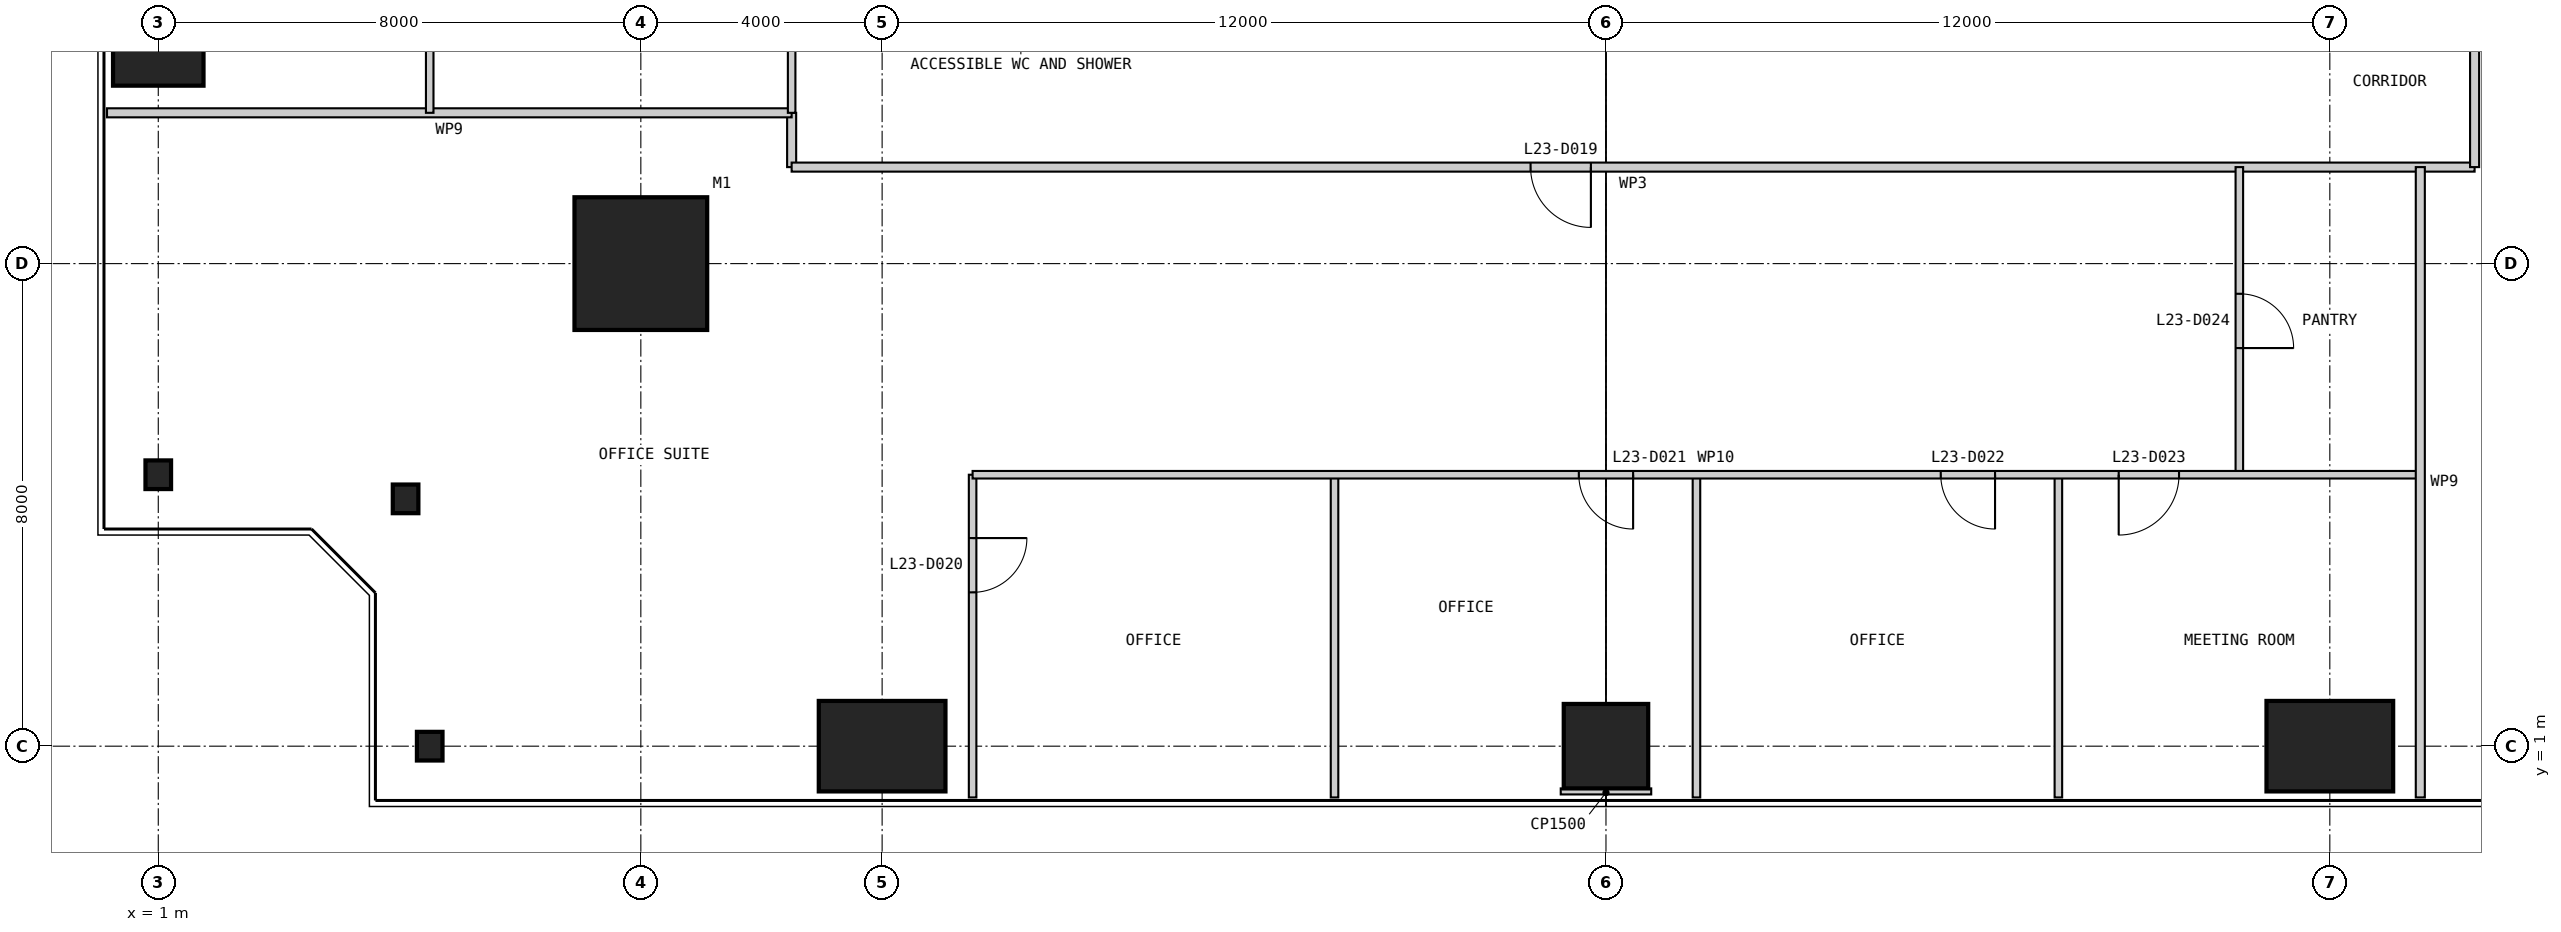
"""IFC4 building model, lengths in metres.
Left out: names, types, materials, properties, quantities, classifications, styles, units other than length and angle.
Written with IfcOpenShell. Run it as: python <this file> out.ifc"""

import sys

from ifc_helpers import new_model, si_unit, direction, frame, frame_2d, origin, origin_2d, place, context, subcontext, project, spatial, rectangle, i_section, extrude, element, fill, save


model = new_model("IFC4")
c1 = context("Model", 3, precision=1e-05, world=origin(), true_north=direction((0.0, 1.0)))
c2 = subcontext(c1, "Body", "Model", "MODEL_VIEW")
j1 = project(units=[si_unit("LENGTHUNIT", "METRE"), si_unit("PLANEANGLEUNIT", "RADIAN")], contexts=[c1])
p1 = place(None, origin())
s1 = spatial("IfcSite", under=j1, at=p1, CompositionType="ELEMENT")
p2 = place(p1, origin())
s2 = spatial("IfcBuilding", under=s1, at=p2, CompositionType="ELEMENT")
p3 = place(p2, frame((0.0, 0.0, 102.4)))
s3 = spatial("IfcBuildingStorey", under=s2, at=p3, CompositionType="ELEMENT", Elevation=102.4)
p4 = place(p3, frame((9.0, 9.0, 0.0), z_axis=(0.0, 0.0, 1.0), x_axis=(1.0, 0.0, 0.0)))
e1 = element("IfcColumn", 1, at=p4, inside=s3, PredefinedType="COLUMN", context=c2, shape_type="SweptSolid", body=[
    extrude(rectangle(XDim=2.2, YDim=2.2, at=origin_2d()), origin(), (0.0, 0.0, 1.0), 4.0),
])
p5 = place(p3, frame((5.5, 1.0, 0.0), z_axis=(0.0, 0.0, 1.0), x_axis=(1.0, 0.0, 0.0)))
e2 = element("IfcColumn", 2, at=p5, inside=s3, PredefinedType="COLUMN", context=c2, shape_type="SweptSolid", body=[
    extrude(i_section(OverallWidth=0.424, OverallDepth=0.475, WebThickness=0.048, FlangeThickness=0.077, at=origin_2d()), origin(), (0.0, 0.0, 1.0), 4.0),
])
p6 = place(p3, frame((13.0, 1.0, 0.0), z_axis=(0.0, 0.0, 1.0), x_axis=(1.0, 0.0, 0.0)))
e3 = element("IfcColumn", 3, at=p6, inside=s3, PredefinedType="COLUMN", context=c2, shape_type="SweptSolid", body=[
    extrude(rectangle(XDim=2.1, YDim=1.5, at=origin_2d()), origin(), (0.0, 0.0, 1.0), 4.0),
])
p7 = place(p3, frame((25.0, 1.0, 0.0), z_axis=(0.0, 0.0, 1.0), x_axis=(1.0, 0.0, 0.0)))
e4 = element("IfcColumn", 4, at=p7, inside=s3, PredefinedType="COLUMN", context=c2, shape_type="SweptSolid", body=[
    extrude(rectangle(XDim=1.4, YDim=1.4, at=origin_2d()), origin(), (0.0, 0.0, 1.0), 4.0),
])
p8 = place(p3, frame((37.0, 1.0, 0.0), z_axis=(0.0, 0.0, 1.0), x_axis=(1.0, 0.0, 0.0)))
e5 = element("IfcColumn", 5, at=p8, inside=s3, PredefinedType="COLUMN", context=c2, shape_type="SweptSolid", body=[
    extrude(rectangle(XDim=2.1, YDim=1.5, at=origin_2d()), origin(), (0.0, 0.0, 1.0), 4.0),
])
p9 = place(p3, frame((1.0, 13.0, 0.0), z_axis=(0.0, 0.0, 1.0), x_axis=(1.0, 0.0, 0.0)))
e6 = element("IfcColumn", 6, at=p9, inside=s3, PredefinedType="COLUMN", context=c2, shape_type="SweptSolid", body=[
    extrude(rectangle(XDim=1.5, YDim=2.1, at=origin_2d()), origin(), (0.0, 0.0, 1.0), 4.0),
])
for number, where, z_axis, x_axis in (
    (7, (1.0, 5.5, 0.0), (0.0, 0.0, 1.0), (1.0, 0.0, 0.0)),
    (8, (5.1, 5.1, 0.0), (0.0, 0.0, 1.0), (1.0, 0.0, 0.0)),
):
    element("IfcColumn", number, at=place(p3, frame(where, z_axis=z_axis, x_axis=x_axis)), inside=s3, PredefinedType="COLUMN", context=c2, shape_type="SweptSolid", body=[
        extrude(i_section(OverallWidth=0.424, OverallDepth=0.475, WebThickness=0.048, FlangeThickness=0.077, at=origin_2d()), origin(), (0.0, 0.0, 1.0), 4.0),
    ])
p10 = place(p3, frame((11.5, 11.5, 0.0), z_axis=(0.0, 0.0, 1.0), x_axis=(0.0, -1.0, 0.0)))
e9 = element("IfcWall", 9, at=p10, inside=s3, PredefinedType="PARTITIONING", context=c2, shape_type="SweptSolid", body=[
    extrude(rectangle(XDim=0.9, YDim=0.15, at=frame_2d((0.45, 0.0))), origin(), (0.0, 0.0, 1.0), 3.85),
])
p11 = place(p3, frame((11.5, 10.6, 0.0), z_axis=(0.0, 0.0, 1.0), x_axis=(1.0, 0.0, 0.0)))
e10 = element("IfcWall", 10, at=p11, inside=s3, PredefinedType="PARTITIONING", context=c2, shape_type="SweptSolid", body=[
    extrude(rectangle(XDim=27.9, YDim=0.15, at=frame_2d((13.95, 0.0))), origin(), (0.0, 0.0, 1.0), 3.85),
])
p12 = place(p11, frame((12.25, 0.0, 0.0)))
e11 = element("IfcOpeningElement", 11, at=p12, cuts=e10, PredefinedType="OPENING", context=c2, shape_type="SweptSolid", body=[
    extrude(rectangle(XDim=1.0, YDim=2.2, at=frame_2d((0.5, 1.1))), frame((0.0, 0.085, 0.0), z_axis=(0.0, -1.0, 0.0), x_axis=(1.0, 0.0, 0.0)), (0.0, 0.0, 1.0), 0.17),
])
p13 = place(p3, frame((0.15, 11.5, 0.0), z_axis=(0.0, 0.0, 1.0), x_axis=(1.0, 0.0, 0.0)))
e12 = element("IfcWall", 12, at=p13, inside=s3, PredefinedType="PARTITIONING", context=c2, shape_type="SweptSolid", body=[
    extrude(rectangle(XDim=11.35, YDim=0.15, at=frame_2d((5.675, 0.0))), origin(), (0.0, 0.0, 1.0), 3.85),
])
p14 = place(p3, frame((14.5, 0.15, 0.0), z_axis=(0.0, 0.0, 1.0), x_axis=(0.0, 1.0, 0.0)))
e13 = element("IfcWall", 13, at=p14, inside=s3, PredefinedType="PARTITIONING", context=c2, shape_type="SweptSolid", body=[
    extrude(rectangle(XDim=5.35, YDim=0.125, at=frame_2d((2.675, 0.0))), origin(), (0.0, 0.0, 1.0), 3.85),
])
p15 = place(p14, frame((3.4, 0.0, 0.0)))
e14 = element("IfcOpeningElement", 14, at=p15, cuts=e13, PredefinedType="OPENING", context=c2, shape_type="SweptSolid", body=[
    extrude(rectangle(XDim=0.9, YDim=2.2, at=frame_2d((0.45, 1.1))), frame((0.0, 0.073, 0.0), z_axis=(0.0, -1.0, 0.0), x_axis=(1.0, 0.0, 0.0)), (0.0, 0.0, 1.0), 0.145),
])
for number, where, z_axis, x_axis in (
    (15, (20.5, 0.15, 0.0), (0.0, 0.0, 1.0), (0.0, 1.0, 0.0)),
    (16, (26.5, 0.15, 0.0), (0.0, 0.0, 1.0), (0.0, 1.0, 0.0)),
    (17, (32.5, 0.15, 0.0), (0.0, 0.0, 1.0), (0.0, 1.0, 0.0)),
):
    element("IfcWall", number, at=place(p3, frame(where, z_axis=z_axis, x_axis=x_axis)), inside=s3, PredefinedType="PARTITIONING", context=c2, shape_type="SweptSolid", body=[
        extrude(rectangle(XDim=5.35, YDim=0.125, at=frame_2d((2.675, 0.0))), origin(), (0.0, 0.0, 1.0), 3.85),
    ])
p16 = place(p3, frame((35.5, 5.5, 0.0), z_axis=(0.0, 0.0, 1.0), x_axis=(0.0, 1.0, 0.0)))
e18 = element("IfcWall", 18, at=p16, inside=s3, PredefinedType="PARTITIONING", context=c2, shape_type="SweptSolid", body=[
    extrude(rectangle(XDim=5.1, YDim=0.125, at=frame_2d((2.55, 0.0))), origin(), (0.0, 0.0, 1.0), 3.85),
])
p17 = place(p16, frame((2.1, 0.0, 0.0)))
e19 = element("IfcOpeningElement", 19, at=p17, cuts=e18, PredefinedType="OPENING", context=c2, shape_type="SweptSolid", body=[
    extrude(rectangle(XDim=0.9, YDim=2.2, at=frame_2d((0.45, 1.1))), frame((0.0, 0.073, 0.0), z_axis=(0.0, -1.0, 0.0), x_axis=(1.0, 0.0, 0.0)), (0.0, 0.0, 1.0), 0.145),
])
p18 = place(p3, frame((14.5, 5.5, 0.0), z_axis=(0.0, 0.0, 1.0), x_axis=(1.0, 0.0, 0.0)))
e20 = element("IfcWall", 20, at=p18, inside=s3, PredefinedType="PARTITIONING", context=c2, shape_type="SweptSolid", body=[
    extrude(rectangle(XDim=24.0, YDim=0.125, at=frame_2d((12.0, 0.0))), origin(), (0.0, 0.0, 1.0), 3.85),
])
p19 = place(p18, frame((10.05, 0.0, 0.0)))
e21 = element("IfcOpeningElement", 21, at=p19, cuts=e20, PredefinedType="OPENING", context=c2, shape_type="SweptSolid", body=[
    extrude(rectangle(XDim=0.9, YDim=2.2, at=frame_2d((0.45, 1.1))), frame((0.0, 0.073, 0.0), z_axis=(0.0, -1.0, 0.0), x_axis=(1.0, 0.0, 0.0)), (0.0, 0.0, 1.0), 0.145),
])
p20 = place(p18, frame((16.05, 0.0, 0.0)))
e22 = element("IfcOpeningElement", 22, at=p20, cuts=e20, PredefinedType="OPENING", context=c2, shape_type="SweptSolid", body=[
    extrude(rectangle(XDim=0.9, YDim=2.2, at=frame_2d((0.45, 1.1))), frame((0.0, 0.073, 0.0), z_axis=(0.0, -1.0, 0.0), x_axis=(1.0, 0.0, 0.0)), (0.0, 0.0, 1.0), 0.145),
])
p21 = place(p18, frame((19.0, 0.0, 0.0)))
e23 = element("IfcOpeningElement", 23, at=p21, cuts=e20, PredefinedType="OPENING", context=c2, shape_type="SweptSolid", body=[
    extrude(rectangle(XDim=1.0, YDim=2.2, at=frame_2d((0.5, 1.1))), frame((0.0, 0.073, 0.0), z_axis=(0.0, -1.0, 0.0), x_axis=(1.0, 0.0, 0.0)), (0.0, 0.0, 1.0), 0.145),
])
p22 = place(p3, frame((39.4, 10.6, 0.0), z_axis=(0.0, 0.0, 1.0), x_axis=(0.0, 1.0, 0.0)))
e24 = element("IfcWall", 24, at=p22, inside=s3, PredefinedType="PARTITIONING", context=c2, shape_type="SweptSolid", body=[
    extrude(rectangle(XDim=28.8, YDim=0.15, at=frame_2d((14.4, 0.0))), origin(), (0.0, 0.0, 1.0), 3.85),
])
p23 = place(p22, frame((12.4, 0.0, 0.0)))
e25 = element("IfcOpeningElement", 25, at=p23, cuts=e24, PredefinedType="OPENING", context=c2, shape_type="SweptSolid", body=[
    extrude(rectangle(XDim=1.0, YDim=2.2, at=frame_2d((0.5, 1.1))), frame((0.0, 0.085, 0.0), z_axis=(0.0, -1.0, 0.0), x_axis=(1.0, 0.0, 0.0)), (0.0, 0.0, 1.0), 0.17),
])
p24 = place(p3, frame((38.5, 0.15, 0.0), z_axis=(0.0, 0.0, 1.0), x_axis=(0.0, 1.0, 0.0)))
e26 = element("IfcWall", 26, at=p24, inside=s3, PredefinedType="PARTITIONING", context=c2, shape_type="SweptSolid", body=[
    extrude(rectangle(XDim=10.45, YDim=0.15, at=frame_2d((5.225, 0.0))), origin(), (0.0, 0.0, 1.0), 3.85),
])
p25 = place(p3, frame((5.5, 17.5, 0.0), z_axis=(0.0, 0.0, 1.0), x_axis=(0.0, -1.0, 0.0)))
e27 = element("IfcWall", 27, at=p25, inside=s3, PredefinedType="PARTITIONING", context=c2, shape_type="SweptSolid", body=[
    extrude(rectangle(XDim=6.0, YDim=0.125, at=frame_2d((3.0, 0.0))), origin(), (0.0, 0.0, 1.0), 3.85),
])
p26 = place(p3, frame((11.5, 14.5, 0.0), z_axis=(0.0, 0.0, 1.0), x_axis=(0.0, -1.0, 0.0)))
e28 = element("IfcWall", 28, at=p26, inside=s3, PredefinedType="PARTITIONING", context=c2, shape_type="SweptSolid", body=[
    extrude(rectangle(XDim=3.0, YDim=0.125, at=frame_2d((1.5, 0.0))), origin(), (0.0, 0.0, 1.0), 3.85),
])
p27 = place(p3, frame((25.0, 0.2, 0.0), z_axis=(0.0, 0.0, 1.0), x_axis=(0.0, 1.0, 0.0)))
e29 = element("IfcWall", 29, at=p27, inside=s3, PredefinedType="PARTITIONING", context=c2, shape_type="SweptSolid", body=[
    extrude(rectangle(XDim=0.1, YDim=1.5, at=frame_2d((0.05, 0.0))), origin(), (0.0, 0.0, 1.0), 3.85),
])
p28 = place(p12, frame((1.0, 0.0, 0.0), z_axis=(0.0, 0.0, 1.0), x_axis=(-1.0, 0.0, 0.0)))
e30 = element("IfcDoor", 30, at=p28, inside=s3, OperationType="SINGLE_SWING_LEFT", PredefinedType="DOOR", context=c2, shape_type="SweptSolid", body=[
    extrude(rectangle(XDim=1.0, YDim=2.2, at=frame_2d((0.5, 1.1))), frame((0.0, 0.025, 0.0), z_axis=(0.0, -1.0, 0.0), x_axis=(1.0, 0.0, 0.0)), (0.0, 0.0, 1.0), 0.05),
])
fill(e11, e30)
p29 = place(p15, frame((0.9, 0.0, 0.0), z_axis=(0.0, 0.0, 1.0), x_axis=(-1.0, 0.0, 0.0)))
e31 = element("IfcDoor", 31, at=p29, inside=s3, OperationType="SINGLE_SWING_LEFT", PredefinedType="DOOR", context=c2, shape_type="SweptSolid", body=[
    extrude(rectangle(XDim=0.9, YDim=2.2, at=frame_2d((0.45, 1.1))), frame((0.0, 0.025, 0.0), z_axis=(0.0, -1.0, 0.0), x_axis=(1.0, 0.0, 0.0)), (0.0, 0.0, 1.0), 0.05),
])
fill(e14, e31)
p30 = place(p19, frame((0.9, 0.0, 0.0), z_axis=(0.0, 0.0, 1.0), x_axis=(-1.0, 0.0, 0.0)))
e32 = element("IfcDoor", 32, at=p30, inside=s3, OperationType="SINGLE_SWING_LEFT", PredefinedType="DOOR", context=c2, shape_type="SweptSolid", body=[
    extrude(rectangle(XDim=0.9, YDim=2.2, at=frame_2d((0.45, 1.1))), frame((0.0, 0.025, 0.0), z_axis=(0.0, -1.0, 0.0), x_axis=(1.0, 0.0, 0.0)), (0.0, 0.0, 1.0), 0.05),
])
fill(e21, e32)
p31 = place(p20, frame((0.9, 0.0, 0.0), z_axis=(0.0, 0.0, 1.0), x_axis=(-1.0, 0.0, 0.0)))
e33 = element("IfcDoor", 33, at=p31, inside=s3, OperationType="SINGLE_SWING_LEFT", PredefinedType="DOOR", context=c2, shape_type="SweptSolid", body=[
    extrude(rectangle(XDim=0.9, YDim=2.2, at=frame_2d((0.45, 1.1))), frame((0.0, 0.025, 0.0), z_axis=(0.0, -1.0, 0.0), x_axis=(1.0, 0.0, 0.0)), (0.0, 0.0, 1.0), 0.05),
])
fill(e22, e33)
p32 = place(p21, frame((1.0, 0.0, 0.0), z_axis=(0.0, 0.0, 1.0), x_axis=(-1.0, 0.0, 0.0)))
e34 = element("IfcDoor", 34, at=p32, inside=s3, OperationType="SINGLE_SWING_RIGHT", PredefinedType="DOOR", context=c2, shape_type="SweptSolid", body=[
    extrude(rectangle(XDim=1.0, YDim=2.2, at=frame_2d((0.5, 1.1))), frame((0.0, 0.025, 0.0), z_axis=(0.0, -1.0, 0.0), x_axis=(1.0, 0.0, 0.0)), (0.0, 0.0, 1.0), 0.05),
])
fill(e23, e34)
p33 = place(p17, frame((0.9, 0.0, 0.0), z_axis=(0.0, 0.0, 1.0), x_axis=(-1.0, 0.0, 0.0)))
e35 = element("IfcDoor", 35, at=p33, inside=s3, OperationType="SINGLE_SWING_RIGHT", PredefinedType="DOOR", context=c2, shape_type="SweptSolid", body=[
    extrude(rectangle(XDim=0.9, YDim=2.2, at=frame_2d((0.45, 1.1))), frame((0.0, 0.025, 0.0), z_axis=(0.0, -1.0, 0.0), x_axis=(1.0, 0.0, 0.0)), (0.0, 0.0, 1.0), 0.05),
])
fill(e19, e35)
save(model, sys.argv[1])
